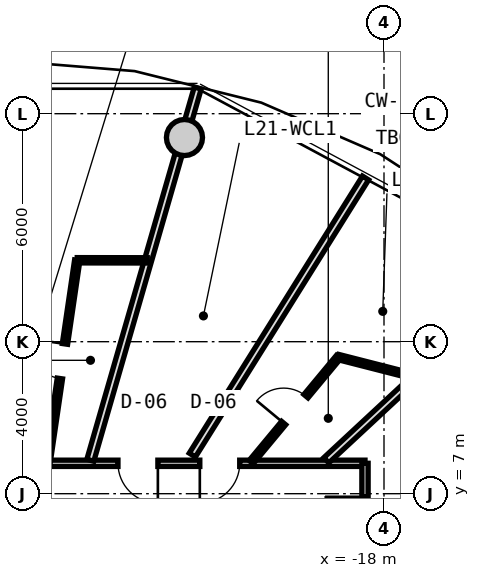
"""IFC4 building model, lengths in metres.
Left out: names, types, materials, properties, quantities, classifications, styles, units other than length and angle.
Written with IfcOpenShell. Run it as: python <this file> out.ifc"""

import sys

from ifc_helpers import new_model, si_unit, direction, frame, frame_2d, origin, origin_2d, place, context, subcontext, project, spatial, rectangle, circle, extrude, source, transform, mapped, element, fill, save


model = new_model("IFC4")
c1 = context("Model", 3, precision=1e-05, world=origin(), true_north=direction((0.0, 1.0)))
c2 = subcontext(c1, "Body", "Model", "MODEL_VIEW")
j1 = project(units=[si_unit("LENGTHUNIT", "METRE"), si_unit("PLANEANGLEUNIT", "RADIAN")], contexts=[c1])
p1 = place(None, origin())
s1 = spatial("IfcSite", under=j1, at=p1, CompositionType="ELEMENT")
p2 = place(p1, origin())
s2 = spatial("IfcBuilding", under=s1, at=p2, CompositionType="ELEMENT")
p3 = place(p2, frame((0.0, 0.0, 70.4)))
s3 = spatial("IfcBuildingStorey", under=s2, at=p3, CompositionType="ELEMENT", Elevation=70.4)
m1 = source(origin(), c2, "Body", "SweptSolid", [
    extrude(circle(Radius=0.475, at=origin_2d()), origin(), (0.0, 0.0, 1.0), 3.05),
])
p4 = place(p3, frame((-23.251, 16.373, 0.0), z_axis=(0.0, 0.0, 1.0), x_axis=(1.0, 0.0, 0.0)))
e1 = element("IfcColumn", 1, at=p4, inside=s3, PredefinedType="COLUMN", context=c2, shape_type="MappedRepresentation", body=[
    mapped(m1, transform((0.0, 0.0, 0.0), x_axis=(1.0, 0.0, 0.0), y_axis=(0.0, 1.0, 0.0), z_axis=(0.0, 0.0, 1.0), scale=1.0)),
])
m2 = source(origin(), c2, "Body", "SweptSolid", [
    extrude(rectangle(XDim=19.0, YDim=0.165, at=frame_2d((9.5, 0.0))), origin(), (0.0, 0.0, 1.0), 2.715),
])
p5 = place(p3, frame((-37.5, 7.8, 0.0), z_axis=(0.0, 0.0, 1.0), x_axis=(1.0, 0.0, 0.0)))
e2 = element("IfcWall", 2, at=p5, inside=s3, PredefinedType="PARTITIONING", context=c2, shape_type="MappedRepresentation", body=[
    mapped(m2, transform((0.0, 0.0, 0.0), x_axis=(1.0, 0.0, 0.0), y_axis=(0.0, 1.0, 0.0), z_axis=(0.0, 0.0, 1.0), scale=1.0)),
])
p6 = place(p5, frame((14.653, 0.0, 0.0)))
e3 = element("IfcOpeningElement", 3, at=p6, cuts=e2, PredefinedType="OPENING", context=c2, shape_type="SweptSolid", body=[
    extrude(rectangle(XDim=1.05, YDim=2.15, at=frame_2d((0.525, 1.075))), frame((0.0, 0.093, 0.0), z_axis=(0.0, -1.0, 0.0), x_axis=(1.0, 0.0, 0.0)), (0.0, 0.0, 1.0), 0.185),
])
p7 = place(p5, frame((12.5, 0.0, 0.0)))
e4 = element("IfcOpeningElement", 4, at=p7, cuts=e2, PredefinedType="OPENING", context=c2, shape_type="SweptSolid", body=[
    extrude(rectangle(XDim=1.05, YDim=2.15, at=frame_2d((0.525, 1.075))), frame((0.0, 0.093, 0.0), z_axis=(0.0, -1.0, 0.0), x_axis=(1.0, 0.0, 0.0)), (0.0, 0.0, 1.0), 0.185),
])
p8 = place(p5, frame((9.352, 0.0, 0.0)))
e5 = element("IfcOpeningElement", 5, at=p8, cuts=e2, PredefinedType="OPENING", context=c2, shape_type="SweptSolid", body=[
    extrude(rectangle(XDim=1.05, YDim=2.15, at=frame_2d((0.525, 1.075))), frame((0.0, 0.093, 0.0), z_axis=(0.0, -1.0, 0.0), x_axis=(1.0, 0.0, 0.0)), (0.0, 0.0, 1.0), 0.185),
])
p9 = place(p5, frame((7.806, 0.0, 0.0)))
e6 = element("IfcOpeningElement", 6, at=p9, cuts=e2, PredefinedType="OPENING", context=c2, shape_type="SweptSolid", body=[
    extrude(rectangle(XDim=1.05, YDim=2.15, at=frame_2d((0.525, 1.075))), frame((0.0, 0.093, 0.0), z_axis=(0.0, -1.0, 0.0), x_axis=(1.0, 0.0, 0.0)), (0.0, 0.0, 1.0), 0.185),
])
p10 = place(p5, frame((4.773, 0.0, 0.0)))
e7 = element("IfcOpeningElement", 7, at=p10, cuts=e2, PredefinedType="OPENING", context=c2, shape_type="SweptSolid", body=[
    extrude(rectangle(XDim=1.05, YDim=2.15, at=frame_2d((0.525, 1.075))), frame((0.0, 0.093, 0.0), z_axis=(0.0, -1.0, 0.0), x_axis=(1.0, 0.0, 0.0)), (0.0, 0.0, 1.0), 0.185),
])
p11 = place(p5, frame((2.251, 0.0, 0.0)))
e8 = element("IfcOpeningElement", 8, at=p11, cuts=e2, PredefinedType="OPENING", context=c2, shape_type="SweptSolid", body=[
    extrude(rectangle(XDim=1.05, YDim=2.15, at=frame_2d((0.525, 1.075))), frame((0.0, 0.093, 0.0), z_axis=(0.0, -1.0, 0.0), x_axis=(1.0, 0.0, 0.0)), (0.0, 0.0, 1.0), 0.185),
])
m3 = source(origin(), c2, "Body", "SweptSolid", [
    extrude(rectangle(XDim=15.6, YDim=0.165, at=frame_2d((7.8, 0.0))), origin(), (0.0, 0.0, 1.0), 2.715),
])
p12 = place(p3, frame((-18.5, 7.8, 0.0), z_axis=(0.0, 0.0, 1.0), x_axis=(0.0, -1.0, 0.0)))
e9 = element("IfcWall", 9, at=p12, inside=s3, PredefinedType="PARTITIONING", context=c2, shape_type="MappedRepresentation", body=[
    mapped(m3, transform((0.0, 0.0, 0.0), x_axis=(1.0, 0.0, 0.0), y_axis=(0.0, 1.0, 0.0), z_axis=(0.0, 0.0, 1.0), scale=1.0)),
])
p13 = place(p12, frame((12.141, 0.0, 0.0)))
e10 = element("IfcOpeningElement", 10, at=p13, cuts=e9, PredefinedType="OPENING", context=c2, shape_type="SweptSolid", body=[
    extrude(rectangle(XDim=1.25, YDim=2.2, at=frame_2d((0.625, 1.1))), frame((0.0, 0.093, 0.0), z_axis=(0.0, -1.0, 0.0), x_axis=(1.0, 0.0, 0.0)), (0.0, 0.0, 1.0), 0.185),
])
p14 = place(p12, frame((7.175, 0.0, 0.0)))
e11 = element("IfcOpeningElement", 11, at=p14, cuts=e9, PredefinedType="OPENING", context=c2, shape_type="SweptSolid", body=[
    extrude(rectangle(XDim=1.25, YDim=2.2, at=frame_2d((0.625, 1.1))), frame((0.0, 0.093, 0.0), z_axis=(0.0, -1.0, 0.0), x_axis=(1.0, 0.0, 0.0)), (0.0, 0.0, 1.0), 0.185),
])
p15 = place(p12, frame((2.826, 0.0, 0.0)))
e12 = element("IfcOpeningElement", 12, at=p15, cuts=e9, PredefinedType="OPENING", context=c2, shape_type="SweptSolid", body=[
    extrude(rectangle(XDim=1.05, YDim=2.15, at=frame_2d((0.525, 1.075))), frame((0.0, 0.093, 0.0), z_axis=(0.0, -1.0, 0.0), x_axis=(1.0, 0.0, 0.0)), (0.0, 0.0, 1.0), 0.185),
])
p16 = place(p12, frame((0.881, 0.0, 0.0)))
e13 = element("IfcOpeningElement", 13, at=p16, cuts=e9, PredefinedType="OPENING", context=c2, shape_type="SweptSolid", body=[
    extrude(rectangle(XDim=1.05, YDim=2.15, at=frame_2d((0.525, 1.075))), frame((0.0, 0.093, 0.0), z_axis=(0.0, -1.0, 0.0), x_axis=(1.0, 0.0, 0.0)), (0.0, 0.0, 1.0), 0.185),
])
m4 = source(origin(), c2, "Body", "SweptSolid", [
    extrude(rectangle(XDim=7.435, YDim=0.19, at=frame_2d((3.717, 0.0))), origin(), (0.0, 0.0, 1.0), 2.165),
])
p17 = place(p3, frame((-19.517, 7.88, 0.0), z_axis=(0.0, 0.0, 1.0), x_axis=(0.732651956848, 0.680603489652, 0.0)))
e14 = element("IfcWall", 14, at=p17, inside=s3, PredefinedType="PARTITIONING", context=c2, shape_type="MappedRepresentation", body=[
    mapped(m4, transform((0.0, 0.0, 0.0), x_axis=(1.0, 0.0, 0.0), y_axis=(0.0, 1.0, 0.0), z_axis=(0.0, 0.0, 1.0), scale=1.0)),
])
m5 = source(origin(), c2, "Body", "SweptSolid", [
    extrude(rectangle(XDim=7.677, YDim=0.19, at=frame_2d((3.838, 0.0))), origin(), (0.0, 0.0, 1.0), 2.715),
])
p18 = place(p3, frame((-18.297, 5.231, 0.0), z_axis=(0.0, 0.0, 1.0), x_axis=(0.882725057546, 0.469889851753, 0.0)))
e15 = element("IfcWall", 15, at=p18, inside=s3, PredefinedType="PARTITIONING", context=c2, shape_type="MappedRepresentation", body=[
    mapped(m5, transform((0.0, 0.0, 0.0), x_axis=(1.0, 0.0, 0.0), y_axis=(0.0, 1.0, 0.0), z_axis=(0.0, 0.0, 1.0), scale=1.0)),
])
m6 = source(origin(), c2, "Body", "SweptSolid", [
    extrude(rectangle(XDim=10.196, YDim=0.19, at=frame_2d((5.098, 0.0))), origin(), (0.0, 0.0, 1.0), 2.165),
])
p19 = place(p3, frame((-25.727, 7.88, 0.0), z_axis=(0.0, 0.0, 1.0), x_axis=(0.277136420347, 0.960830580549, 0.0)))
e16 = element("IfcWall", 16, at=p19, inside=s3, PredefinedType="PARTITIONING", context=c2, shape_type="MappedRepresentation", body=[
    mapped(m6, transform((0.0, 0.0, 0.0), x_axis=(1.0, 0.0, 0.0), y_axis=(0.0, 1.0, 0.0), z_axis=(0.0, 0.0, 1.0), scale=1.0)),
])
m7 = source(origin(), c2, "Body", "SweptSolid", [
    extrude(rectangle(XDim=8.598, YDim=0.19, at=frame_2d((4.299, 0.0))), origin(), (0.0, 0.0, 1.0), 2.715),
])
p20 = place(p3, frame((-23.043, 8.017, 0.0), z_axis=(0.0, 0.0, 1.0), x_axis=(0.530039776395, 0.847972779893, 0.0)))
e17 = element("IfcWall", 17, at=p20, inside=s3, PredefinedType="PARTITIONING", context=c2, shape_type="MappedRepresentation", body=[
    mapped(m7, transform((0.0, 0.0, 0.0), x_axis=(1.0, 0.0, 0.0), y_axis=(0.0, 1.0, 0.0), z_axis=(0.0, 0.0, 1.0), scale=1.0)),
])
m8 = source(origin(), c2, "Body", "SweptSolid", [
    extrude(rectangle(XDim=3.594, YDim=0.14, at=frame_2d((1.797, 0.0))), origin(), (0.0, 0.0, 1.0), 2.715),
])
p21 = place(p3, frame((-21.496, 7.83, 0.0), z_axis=(0.0, 0.0, 1.0), x_axis=(0.639001147083, 0.769205781326, 0.0)))
e18 = element("IfcWall", 18, at=p21, inside=s3, PredefinedType="PARTITIONING", context=c2, shape_type="MappedRepresentation", body=[
    mapped(m8, transform((0.0, 0.0, 0.0), x_axis=(1.0, 0.0, 0.0), y_axis=(0.0, 1.0, 0.0), z_axis=(0.0, 0.0, 1.0), scale=1.0)),
])
p22 = place(p21, frame((1.337, 0.0, 0.0)))
e19 = element("IfcOpeningElement", 19, at=p22, cuts=e18, PredefinedType="OPENING", context=c2, shape_type="SweptSolid", body=[
    extrude(rectangle(XDim=0.92, YDim=2.1, at=frame_2d((0.46, 1.05))), frame((0.0, 0.08, 0.0), z_axis=(0.0, -1.0, 0.0), x_axis=(1.0, 0.0, 0.0)), (0.0, 0.0, 1.0), 0.16),
])
m9 = source(origin(), c2, "Body", "SweptSolid", [
    extrude(rectangle(XDim=2.062, YDim=0.14, at=frame_2d((1.031, 0.0))), origin(), (0.0, 0.0, 1.0), 2.355),
])
p23 = place(p3, frame((-19.199, 10.595, 0.0), z_axis=(0.0, 0.0, 1.0), x_axis=(0.968776253543, -0.247936626121, 0.0)))
e20 = element("IfcWall", 20, at=p23, inside=s3, PredefinedType="PARTITIONING", context=c2, shape_type="MappedRepresentation", body=[
    mapped(m9, transform((0.0, 0.0, 0.0), x_axis=(1.0, 0.0, 0.0), y_axis=(0.0, 1.0, 0.0), z_axis=(0.0, 0.0, 1.0), scale=1.0)),
])
m10 = source(origin(), c2, "Body", "SweptSolid", [
    extrude(rectangle(XDim=5.37, YDim=0.14, at=frame_2d((2.685, 0.0))), origin(), (0.0, 0.0, 1.0), 2.715),
])
p24 = place(p3, frame((-26.851, 7.83, 0.0), z_axis=(0.0, 0.0, 1.0), x_axis=(0.145131397853, 0.989412389935, 0.0)))
e21 = element("IfcWall", 21, at=p24, inside=s3, PredefinedType="PARTITIONING", context=c2, shape_type="MappedRepresentation", body=[
    mapped(m10, transform((0.0, 0.0, 0.0), x_axis=(1.0, 0.0, 0.0), y_axis=(0.0, 1.0, 0.0), z_axis=(0.0, 0.0, 1.0), scale=1.0)),
])
p25 = place(p24, frame((2.225, 0.0, 0.0)))
e22 = element("IfcOpeningElement", 22, at=p25, cuts=e21, PredefinedType="OPENING", context=c2, shape_type="SweptSolid", body=[
    extrude(rectangle(XDim=0.92, YDim=2.1, at=frame_2d((0.46, 1.05))), frame((0.0, 0.08, 0.0), z_axis=(0.0, -1.0, 0.0), x_axis=(1.0, 0.0, 0.0)), (0.0, 0.0, 1.0), 0.16),
])
m11 = source(origin(), c2, "Body", "SweptSolid", [
    extrude(rectangle(XDim=1.843, YDim=0.14, at=frame_2d((0.921, 0.0))), origin(), (0.0, 0.0, 1.0), 2.715),
])
p26 = place(p3, frame((-26.072, 13.143, 0.0), z_axis=(0.0, 0.0, 1.0), x_axis=(0.999998937801, -0.001457531246, 0.0)))
e23 = element("IfcWall", 23, at=p26, inside=s3, PredefinedType="PARTITIONING", context=c2, shape_type="MappedRepresentation", body=[
    mapped(m11, transform((0.0, 0.0, 0.0), x_axis=(1.0, 0.0, 0.0), y_axis=(0.0, 1.0, 0.0), z_axis=(0.0, 0.0, 1.0), scale=1.0)),
])
m12 = source(origin(), c2, "Body", "SweptSolid", [
    extrude(rectangle(XDim=1.05, YDim=2.15, at=frame_2d((0.525, 1.075))), frame((0.0, 0.025, 0.0), z_axis=(0.0, -1.0, 0.0), x_axis=(1.0, 0.0, 0.0)), (0.0, 0.0, 1.0), 0.05),
])
p27 = place(p16, frame((1.05, 0.0, 0.0), z_axis=(0.0, 0.0, 1.0), x_axis=(-1.0, 0.0, 0.0)))
e24 = element("IfcDoor", 24, at=p27, inside=s3, OperationType="SINGLE_SWING_RIGHT", PredefinedType="DOOR", context=c2, shape_type="MappedRepresentation", body=[
    mapped(m12, transform((0.0, 0.0, 0.0), x_axis=(1.0, 0.0, 0.0), y_axis=(0.0, 1.0, 0.0), z_axis=(0.0, 0.0, 1.0), scale=1.0)),
])
fill(e13, e24)
p28 = place(p6, frame((1.05, 0.0, 0.0), z_axis=(0.0, 0.0, 1.0), x_axis=(-1.0, 0.0, 0.0)))
e25 = element("IfcDoor", 25, at=p28, inside=s3, OperationType="SINGLE_SWING_RIGHT", PredefinedType="DOOR", context=c2, shape_type="MappedRepresentation", body=[
    mapped(m12, transform((0.0, 0.0, 0.0), x_axis=(1.0, 0.0, 0.0), y_axis=(0.0, 1.0, 0.0), z_axis=(0.0, 0.0, 1.0), scale=1.0)),
])
fill(e3, e25)
m13 = source(origin(), c2, "Body", "SweptSolid", [
    extrude(rectangle(XDim=0.92, YDim=2.1, at=frame_2d((0.46, 1.05))), frame((0.0, 0.025, 0.0), z_axis=(0.0, -1.0, 0.0), x_axis=(1.0, 0.0, 0.0)), (0.0, 0.0, 1.0), 0.05),
])
p29 = place(p22, origin())
e26 = element("IfcDoor", 26, at=p29, inside=s3, OperationType="SINGLE_SWING_LEFT", PredefinedType="DOOR", context=c2, shape_type="MappedRepresentation", body=[
    mapped(m13, transform((0.0, 0.0, 0.0), x_axis=(1.0, 0.0, 0.0), y_axis=(0.0, 1.0, 0.0), z_axis=(0.0, 0.0, 1.0), scale=1.0)),
])
fill(e19, e26)
p30 = place(p7, frame((1.05, 0.0, 0.0), z_axis=(0.0, 0.0, 1.0), x_axis=(-1.0, 0.0, 0.0)))
e27 = element("IfcDoor", 27, at=p30, inside=s3, OperationType="SINGLE_SWING_LEFT", PredefinedType="DOOR", context=c2, shape_type="MappedRepresentation", body=[
    mapped(m12, transform((0.0, 0.0, 0.0), x_axis=(1.0, 0.0, 0.0), y_axis=(0.0, 1.0, 0.0), z_axis=(0.0, 0.0, 1.0), scale=1.0)),
])
fill(e4, e27)
p31 = place(p25, origin())
e28 = element("IfcDoor", 28, at=p31, inside=s3, OperationType="SINGLE_SWING_RIGHT", PredefinedType="DOOR", context=c2, shape_type="MappedRepresentation", body=[
    mapped(m13, transform((0.0, 0.0, 0.0), x_axis=(1.0, 0.0, 0.0), y_axis=(0.0, 1.0, 0.0), z_axis=(0.0, 0.0, 1.0), scale=1.0)),
])
fill(e22, e28)
save(model, sys.argv[1])
